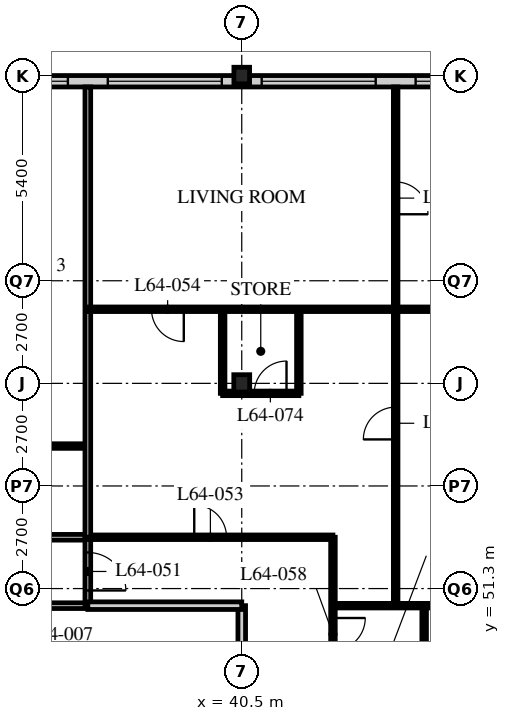
"""IFC4 building model, lengths in metres.
Left out: names, types, materials, properties, quantities, classifications, styles, units other than length and angle.
Written with IfcOpenShell. Run it as: python <this file> out.ifc"""

import sys

from ifc_helpers import new_model, si_unit, direction, frame, frame_2d, origin, origin_2d, place, context, subcontext, project, spatial, rectangle, i_section, extrude, element, fill, save


model = new_model("IFC4")
c1 = context("Model", 3, precision=1e-05, world=origin(), true_north=direction((0.0, 1.0)))
c2 = subcontext(c1, "Body", "Model", "MODEL_VIEW")
j1 = project(units=[si_unit("LENGTHUNIT", "METRE"), si_unit("PLANEANGLEUNIT", "RADIAN")], contexts=[c1])
p1 = place(None, origin())
s1 = spatial("IfcSite", under=j1, at=p1, CompositionType="ELEMENT")
p2 = place(p1, origin())
s2 = spatial("IfcBuilding", under=s1, at=p2, CompositionType="ELEMENT")
p3 = place(p2, frame((0.0, 0.0, 250.2)))
s3 = spatial("IfcBuildingStorey", under=s2, at=p3, CompositionType="ELEMENT", Elevation=250.2)
p4 = place(p3, frame((40.5, 56.7, 0.0), z_axis=(0.0, 0.0, 1.0), x_axis=(1.0, 0.0, 0.0)))
e1 = element("IfcColumn", 1, at=p4, inside=s3, PredefinedType="COLUMN", context=c2, shape_type="SweptSolid", body=[
    extrude(i_section(OverallWidth=0.418, OverallDepth=0.456, WebThickness=0.042, FlangeThickness=0.067, FilletRadius=0.015, at=origin_2d()), origin(), (0.0, 0.0, 1.0), 3.9),
])
p5 = place(p3, frame((40.5, 64.8, 0.0), z_axis=(0.0, 0.0, 1.0), x_axis=(1.0, 0.0, 0.0)))
e2 = element("IfcColumn", 2, at=p5, inside=s3, PredefinedType="COLUMN", context=c2, shape_type="SweptSolid", body=[
    extrude(i_section(OverallWidth=0.412, OverallDepth=0.437, WebThickness=0.036, FlangeThickness=0.058, FilletRadius=0.015, at=origin_2d()), origin(), (0.0, 0.0, 1.0), 3.9),
])
p6 = place(p3, frame((48.3, 64.65, 0.0), z_axis=(0.0, 0.0, 1.0), x_axis=(-1.0, 0.0, 0.0)))
e3 = element("IfcWall", 3, at=p6, inside=s3, PredefinedType="SOLIDWALL", context=c2, shape_type="SweptSolid", body=[
    extrude(rectangle(XDim=40.2, YDim=0.3, at=frame_2d((20.1, 0.0))), origin(), (0.0, 0.0, 1.0), 3.69),
])
p7 = place(p6, frame((0.225, 0.0, 0.6)))
e4 = element("IfcOpeningElement", 4, at=p7, cuts=e3, PredefinedType="OPENING", context=c2, shape_type="SweptSolid", body=[
    extrude(rectangle(XDim=3.0, YDim=2.4, at=frame_2d((1.5, 1.2))), frame((0.0, 0.16, 0.0), z_axis=(0.0, -1.0, 0.0), x_axis=(1.0, 0.0, 0.0)), (0.0, 0.0, 1.0), 0.32),
])
p8 = place(p6, frame((4.275, 0.0, 0.6)))
e5 = element("IfcOpeningElement", 5, at=p8, cuts=e3, PredefinedType="OPENING", context=c2, shape_type="SweptSolid", body=[
    extrude(rectangle(XDim=3.0, YDim=2.4, at=frame_2d((1.5, 1.2))), frame((0.0, 0.16, 0.0), z_axis=(0.0, -1.0, 0.0), x_axis=(1.0, 0.0, 0.0)), (0.0, 0.0, 1.0), 0.32),
])
p9 = place(p6, frame((8.325, 0.0, 0.6)))
e6 = element("IfcOpeningElement", 6, at=p9, cuts=e3, PredefinedType="OPENING", context=c2, shape_type="SweptSolid", body=[
    extrude(rectangle(XDim=3.0, YDim=2.4, at=frame_2d((1.5, 1.2))), frame((0.0, 0.16, 0.0), z_axis=(0.0, -1.0, 0.0), x_axis=(1.0, 0.0, 0.0)), (0.0, 0.0, 1.0), 0.32),
])
p10 = place(p6, frame((12.375, 0.0, 0.6)))
e7 = element("IfcOpeningElement", 7, at=p10, cuts=e3, PredefinedType="OPENING", context=c2, shape_type="SweptSolid", body=[
    extrude(rectangle(XDim=3.0, YDim=2.4, at=frame_2d((1.5, 1.2))), frame((0.0, 0.16, 0.0), z_axis=(0.0, -1.0, 0.0), x_axis=(1.0, 0.0, 0.0)), (0.0, 0.0, 1.0), 0.32),
])
p11 = place(p6, frame((16.425, 0.0, 0.6)))
e8 = element("IfcOpeningElement", 8, at=p11, cuts=e3, PredefinedType="OPENING", context=c2, shape_type="SweptSolid", body=[
    extrude(rectangle(XDim=3.0, YDim=2.4, at=frame_2d((1.5, 1.2))), frame((0.0, 0.16, 0.0), z_axis=(0.0, -1.0, 0.0), x_axis=(1.0, 0.0, 0.0)), (0.0, 0.0, 1.0), 0.32),
])
p12 = place(p6, frame((20.475, 0.0, 0.6)))
e9 = element("IfcOpeningElement", 9, at=p12, cuts=e3, PredefinedType="OPENING", context=c2, shape_type="SweptSolid", body=[
    extrude(rectangle(XDim=3.0, YDim=2.4, at=frame_2d((1.5, 1.2))), frame((0.0, 0.16, 0.0), z_axis=(0.0, -1.0, 0.0), x_axis=(1.0, 0.0, 0.0)), (0.0, 0.0, 1.0), 0.32),
])
p13 = place(p6, frame((24.525, 0.0, 0.6)))
e10 = element("IfcOpeningElement", 10, at=p13, cuts=e3, PredefinedType="OPENING", context=c2, shape_type="SweptSolid", body=[
    extrude(rectangle(XDim=3.0, YDim=2.4, at=frame_2d((1.5, 1.2))), frame((0.0, 0.16, 0.0), z_axis=(0.0, -1.0, 0.0), x_axis=(1.0, 0.0, 0.0)), (0.0, 0.0, 1.0), 0.32),
])
p14 = place(p6, frame((28.575, 0.0, 0.6)))
e11 = element("IfcOpeningElement", 11, at=p14, cuts=e3, PredefinedType="OPENING", context=c2, shape_type="SweptSolid", body=[
    extrude(rectangle(XDim=3.0, YDim=2.4, at=frame_2d((1.5, 1.2))), frame((0.0, 0.16, 0.0), z_axis=(0.0, -1.0, 0.0), x_axis=(1.0, 0.0, 0.0)), (0.0, 0.0, 1.0), 0.32),
])
p15 = place(p6, frame((32.625, 0.0, 0.6)))
e12 = element("IfcOpeningElement", 12, at=p15, cuts=e3, PredefinedType="OPENING", context=c2, shape_type="SweptSolid", body=[
    extrude(rectangle(XDim=3.0, YDim=2.4, at=frame_2d((1.5, 1.2))), frame((0.0, 0.16, 0.0), z_axis=(0.0, -1.0, 0.0), x_axis=(1.0, 0.0, 0.0)), (0.0, 0.0, 1.0), 0.32),
])
p16 = place(p6, frame((36.675, 0.0, 0.6)))
e13 = element("IfcOpeningElement", 13, at=p16, cuts=e3, PredefinedType="OPENING", context=c2, shape_type="SweptSolid", body=[
    extrude(rectangle(XDim=3.0, YDim=2.4, at=frame_2d((1.5, 1.2))), frame((0.0, 0.16, 0.0), z_axis=(0.0, -1.0, 0.0), x_axis=(1.0, 0.0, 0.0)), (0.0, 0.0, 1.0), 0.32),
])
p17 = place(p3, frame((12.15, 52.65, 0.0), z_axis=(0.0, 0.0, 1.0), x_axis=(1.0, 0.0, 0.0)))
e14 = element("IfcWall", 14, at=p17, inside=s3, PredefinedType="PARTITIONING", context=c2, shape_type="SweptSolid", body=[
    extrude(rectangle(XDim=24.3, YDim=0.15, at=frame_2d((12.15, 0.0))), origin(), (0.0, 0.0, 1.0), 3.69),
])
p18 = place(p17, frame((4.45, 0.0, 0.0)))
e15 = element("IfcOpeningElement", 15, at=p18, cuts=e14, PredefinedType="OPENING", context=c2, shape_type="SweptSolid", body=[
    extrude(rectangle(XDim=1.0, YDim=2.1, at=frame_2d((0.5, 1.05))), frame((0.0, 0.085, 0.0), z_axis=(0.0, -1.0, 0.0), x_axis=(1.0, 0.0, 0.0)), (0.0, 0.0, 1.0), 0.17),
])
p19 = place(p17, frame((1.525, 0.0, 0.0)))
e16 = element("IfcOpeningElement", 16, at=p19, cuts=e14, PredefinedType="OPENING", context=c2, shape_type="SweptSolid", body=[
    extrude(rectangle(XDim=1.0, YDim=2.1, at=frame_2d((0.5, 1.05))), frame((0.0, 0.085, 0.0), z_axis=(0.0, -1.0, 0.0), x_axis=(1.0, 0.0, 0.0)), (0.0, 0.0, 1.0), 0.17),
])
p20 = place(p3, frame((29.56, 50.85, 0.0), z_axis=(0.0, 0.0, 1.0), x_axis=(1.0, 0.0, 0.0)))
e17 = element("IfcWall", 17, at=p20, inside=s3, PredefinedType="PARTITIONING", context=c2, shape_type="SweptSolid", body=[
    extrude(rectangle(XDim=6.89, YDim=0.15, at=frame_2d((3.445, 0.0))), origin(), (0.0, 0.0, 1.0), 3.69),
])
p21 = place(p20, frame((0.657, 0.0, 0.0)))
e18 = element("IfcOpeningElement", 18, at=p21, cuts=e17, PredefinedType="OPENING", context=c2, shape_type="SweptSolid", body=[
    extrude(rectangle(XDim=1.0, YDim=2.1, at=frame_2d((0.5, 1.05))), frame((0.0, 0.085, 0.0), z_axis=(0.0, -1.0, 0.0), x_axis=(1.0, 0.0, 0.0)), (0.0, 0.0, 1.0), 0.17),
])
p22 = place(p20, frame((2.84, 0.0, 0.0)))
e19 = element("IfcOpeningElement", 19, at=p22, cuts=e17, PredefinedType="OPENING", context=c2, shape_type="SweptSolid", body=[
    extrude(rectangle(XDim=1.0, YDim=2.1, at=frame_2d((0.5, 1.05))), frame((0.0, 0.085, 0.0), z_axis=(0.0, -1.0, 0.0), x_axis=(1.0, 0.0, 0.0)), (0.0, 0.0, 1.0), 0.17),
])
p23 = place(p20, frame((4.873, 0.0, 0.0)))
e20 = element("IfcOpeningElement", 20, at=p23, cuts=e17, PredefinedType="OPENING", context=c2, shape_type="SweptSolid", body=[
    extrude(rectangle(XDim=1.0, YDim=2.1, at=frame_2d((0.5, 1.05))), frame((0.0, 0.085, 0.0), z_axis=(0.0, -1.0, 0.0), x_axis=(1.0, 0.0, 0.0)), (0.0, 0.0, 1.0), 0.17),
])
p24 = place(p3, frame((36.45, 50.85, 0.0), z_axis=(0.0, 0.0, 1.0), x_axis=(0.0, 1.0, 0.0)))
e21 = element("IfcWall", 21, at=p24, inside=s3, PredefinedType="PARTITIONING", context=c2, shape_type="SweptSolid", body=[
    extrude(rectangle(XDim=1.8, YDim=0.15, at=frame_2d((0.9, 0.0))), origin(), (0.0, 0.0, 1.0), 3.69),
])
p25 = place(p24, frame((0.4, 0.0, 0.0)))
e22 = element("IfcOpeningElement", 22, at=p25, cuts=e21, PredefinedType="OPENING", context=c2, shape_type="SweptSolid", body=[
    extrude(rectangle(XDim=1.0, YDim=2.1, at=frame_2d((0.5, 1.05))), frame((0.0, 0.085, 0.0), z_axis=(0.0, -1.0, 0.0), x_axis=(1.0, 0.0, 0.0)), (0.0, 0.0, 1.0), 0.17),
])
p26 = place(p3, frame((40.5, 40.5, 0.0), z_axis=(0.0, 0.0, 1.0), x_axis=(0.0, 1.0, 0.0)))
e23 = element("IfcWall", 23, at=p26, inside=s3, PredefinedType="SOLIDWALL", context=c2, shape_type="SweptSolid", body=[
    extrude(rectangle(XDim=10.35, YDim=0.2, at=frame_2d((5.175, 0.0))), origin(), (0.0, 0.0, 1.0), 3.078),
])
p27 = place(p3, frame((8.15, 55.05, 0.0), z_axis=(0.0, 0.0, 1.0), x_axis=(1.0, 0.0, 0.0)))
e24 = element("IfcWall", 24, at=p27, inside=s3, PredefinedType="PARTITIONING", context=c2, shape_type="SweptSolid", body=[
    extrude(rectangle(XDim=28.3, YDim=0.12, at=frame_2d((14.15, 0.0))), origin(), (0.0, 0.0, 1.0), 3.69),
])
p28 = place(p27, frame((9.025, 0.0, 0.0)))
e25 = element("IfcOpeningElement", 25, at=p28, cuts=e24, PredefinedType="OPENING", context=c2, shape_type="SweptSolid", body=[
    extrude(rectangle(XDim=0.85, YDim=2.1, at=frame_2d((0.425, 1.05))), frame((0.0, 0.07, 0.0), z_axis=(0.0, -1.0, 0.0), x_axis=(1.0, 0.0, 0.0)), (0.0, 0.0, 1.0), 0.14),
])
p29 = place(p27, frame((16.475, 0.0, 0.0)))
e26 = element("IfcOpeningElement", 26, at=p29, cuts=e24, PredefinedType="OPENING", context=c2, shape_type="SweptSolid", body=[
    extrude(rectangle(XDim=0.85, YDim=2.1, at=frame_2d((0.425, 1.05))), frame((0.0, 0.07, 0.0), z_axis=(0.0, -1.0, 0.0), x_axis=(1.0, 0.0, 0.0)), (0.0, 0.0, 1.0), 0.14),
])
p30 = place(p27, frame((20.525, 0.0, 0.0)))
e27 = element("IfcOpeningElement", 27, at=p30, cuts=e24, PredefinedType="OPENING", context=c2, shape_type="SweptSolid", body=[
    extrude(rectangle(XDim=0.85, YDim=2.1, at=frame_2d((0.425, 1.05))), frame((0.0, 0.07, 0.0), z_axis=(0.0, -1.0, 0.0), x_axis=(1.0, 0.0, 0.0)), (0.0, 0.0, 1.0), 0.14),
])
p31 = place(p27, frame((24.575, 0.0, 0.0)))
e28 = element("IfcOpeningElement", 28, at=p31, cuts=e24, PredefinedType="OPENING", context=c2, shape_type="SweptSolid", body=[
    extrude(rectangle(XDim=0.85, YDim=2.1, at=frame_2d((0.425, 1.05))), frame((0.0, 0.07, 0.0), z_axis=(0.0, -1.0, 0.0), x_axis=(1.0, 0.0, 0.0)), (0.0, 0.0, 1.0), 0.14),
])
p32 = place(p27, frame((6.725, 0.0, 0.0)))
e29 = element("IfcOpeningElement", 29, at=p32, cuts=e24, PredefinedType="OPENING", context=c2, shape_type="SweptSolid", body=[
    extrude(rectangle(XDim=0.85, YDim=2.1, at=frame_2d((0.425, 1.05))), frame((0.0, 0.07, 0.0), z_axis=(0.0, -1.0, 0.0), x_axis=(1.0, 0.0, 0.0)), (0.0, 0.0, 1.0), 0.14),
])
p33 = place(p27, frame((2.875, 0.0, 0.0)))
e30 = element("IfcOpeningElement", 30, at=p33, cuts=e24, PredefinedType="OPENING", context=c2, shape_type="SweptSolid", body=[
    extrude(rectangle(XDim=0.85, YDim=2.1, at=frame_2d((0.425, 1.05))), frame((0.0, 0.07, 0.0), z_axis=(0.0, -1.0, 0.0), x_axis=(1.0, 0.0, 0.0)), (0.0, 0.0, 1.0), 0.14),
])
p34 = place(p3, frame((42.9, 52.65, 0.0), z_axis=(0.0, 0.0, 1.0), x_axis=(0.0, -1.0, 0.0)))
e31 = element("IfcWall", 31, at=p34, inside=s3, PredefinedType="PARTITIONING", context=c2, shape_type="SweptSolid", body=[
    extrude(rectangle(XDim=16.2, YDim=0.12, at=frame_2d((8.1, 0.0))), origin(), (0.0, 0.0, 1.0), 3.69),
])
p35 = place(p34, frame((2.125, 0.0, 0.0)))
e32 = element("IfcOpeningElement", 32, at=p35, cuts=e31, PredefinedType="OPENING", context=c2, shape_type="SweptSolid", body=[
    extrude(rectangle(XDim=0.85, YDim=2.1, at=frame_2d((0.425, 1.05))), frame((0.0, 0.07, 0.0), z_axis=(0.0, -1.0, 0.0), x_axis=(1.0, 0.0, 0.0)), (0.0, 0.0, 1.0), 0.14),
])
p36 = place(p34, frame((8.425, 0.0, 0.0)))
e33 = element("IfcOpeningElement", 33, at=p36, cuts=e31, PredefinedType="OPENING", context=c2, shape_type="SweptSolid", body=[
    extrude(rectangle(XDim=0.85, YDim=2.1, at=frame_2d((0.425, 1.05))), frame((0.0, 0.07, 0.0), z_axis=(0.0, -1.0, 0.0), x_axis=(1.0, 0.0, 0.0)), (0.0, 0.0, 1.0), 0.14),
])
p37 = place(p34, frame((12.475, 0.0, 0.0)))
e34 = element("IfcOpeningElement", 34, at=p37, cuts=e31, PredefinedType="OPENING", context=c2, shape_type="SweptSolid", body=[
    extrude(rectangle(XDim=0.85, YDim=2.1, at=frame_2d((0.425, 1.05))), frame((0.0, 0.07, 0.0), z_axis=(0.0, -1.0, 0.0), x_axis=(1.0, 0.0, 0.0)), (0.0, 0.0, 1.0), 0.14),
])
p38 = place(p3, frame((36.45, 52.65, 0.0), z_axis=(0.0, 0.0, 1.0), x_axis=(1.0, 0.0, 0.0)))
e35 = element("IfcWall", 35, at=p38, inside=s3, PredefinedType="PARTITIONING", context=c2, shape_type="SweptSolid", body=[
    extrude(rectangle(XDim=6.45, YDim=0.12, at=frame_2d((3.225, 0.0))), origin(), (0.0, 0.0, 1.0), 3.69),
])
p39 = place(p38, frame((2.8, 0.0, 0.0)))
e36 = element("IfcOpeningElement", 36, at=p39, cuts=e35, PredefinedType="OPENING", context=c2, shape_type="SweptSolid", body=[
    extrude(rectangle(XDim=0.85, YDim=2.1, at=frame_2d((0.425, 1.05))), frame((0.0, 0.07, 0.0), z_axis=(0.0, -1.0, 0.0), x_axis=(1.0, 0.0, 0.0)), (0.0, 0.0, 1.0), 0.14),
])
p40 = place(p3, frame((36.45, 50.85, 0.0), z_axis=(0.0, 0.0, 1.0), x_axis=(1.0, 0.0, 0.0)))
e37 = element("IfcWall", 37, at=p40, inside=s3, PredefinedType="SOLIDWALL", context=c2, shape_type="SweptSolid", body=[
    extrude(rectangle(XDim=4.05, YDim=0.2, at=frame_2d((2.025, 0.0))), origin(), (0.0, 0.0, 1.0), 3.69),
])
p41 = place(p3, frame((42.9, 50.85, 0.0), z_axis=(0.0, 0.0, 1.0), x_axis=(1.0, 0.0, 0.0)))
e38 = element("IfcWall", 38, at=p41, inside=s3, PredefinedType="PARTITIONING", context=c2, shape_type="SweptSolid", body=[
    extrude(rectangle(XDim=13.5, YDim=0.12, at=frame_2d((6.75, 0.0))), origin(), (0.0, 0.0, 1.0), 3.69),
])
p42 = place(p3, frame((36.45, 64.5, 0.0), z_axis=(0.0, 0.0, 1.0), x_axis=(0.0, -1.0, 0.0)))
e39 = element("IfcWall", 39, at=p42, inside=s3, PredefinedType="PARTITIONING", context=c2, shape_type="SweptSolid", body=[
    extrude(rectangle(XDim=11.85, YDim=0.15, at=frame_2d((5.925, 0.0))), origin(), (0.0, 0.0, 1.0), 3.69),
])
p43 = place(p3, frame((36.45, 58.65, 0.0), z_axis=(0.0, 0.0, 1.0), x_axis=(1.0, 0.0, 0.0)))
e40 = element("IfcWall", 40, at=p43, inside=s3, PredefinedType="PARTITIONING", context=c2, shape_type="SweptSolid", body=[
    extrude(rectangle(XDim=15.9, YDim=0.12, at=frame_2d((7.95, 0.0))), origin(), (0.0, 0.0, 1.0), 3.69),
])
p44 = place(p43, frame((1.675, 0.0, 0.0)))
e41 = element("IfcOpeningElement", 41, at=p44, cuts=e40, PredefinedType="OPENING", context=c2, shape_type="SweptSolid", body=[
    extrude(rectangle(XDim=0.85, YDim=2.1, at=frame_2d((0.425, 1.05))), frame((0.0, 0.07, 0.0), z_axis=(0.0, -1.0, 0.0), x_axis=(1.0, 0.0, 0.0)), (0.0, 0.0, 1.0), 0.14),
])
p45 = place(p3, frame((44.55, 64.5, 0.0), z_axis=(0.0, 0.0, 1.0), x_axis=(0.0, -1.0, 0.0)))
e42 = element("IfcWall", 42, at=p45, inside=s3, PredefinedType="PARTITIONING", context=c2, shape_type="SweptSolid", body=[
    extrude(rectangle(XDim=13.65, YDim=0.12, at=frame_2d((6.825, 0.0))), origin(), (0.0, 0.0, 1.0), 3.69),
])
p46 = place(p45, frame((8.425, 0.0, 0.0)))
e43 = element("IfcOpeningElement", 43, at=p46, cuts=e42, PredefinedType="OPENING", context=c2, shape_type="SweptSolid", body=[
    extrude(rectangle(XDim=0.85, YDim=2.1, at=frame_2d((0.425, 1.05))), frame((0.0, 0.07, 0.0), z_axis=(0.0, -1.0, 0.0), x_axis=(1.0, 0.0, 0.0)), (0.0, 0.0, 1.0), 0.14),
])
p47 = place(p45, frame((2.5, 0.0, 0.0)))
e44 = element("IfcOpeningElement", 44, at=p47, cuts=e42, PredefinedType="OPENING", context=c2, shape_type="SweptSolid", body=[
    extrude(rectangle(XDim=0.85, YDim=2.1, at=frame_2d((0.425, 1.05))), frame((0.0, 0.07, 0.0), z_axis=(0.0, -1.0, 0.0), x_axis=(1.0, 0.0, 0.0)), (0.0, 0.0, 1.0), 0.14),
])
p48 = place(p3, frame((45.3, 50.85, 0.0), z_axis=(0.0, 0.0, 1.0), x_axis=(0.0, -1.0, 0.0)))
e45 = element("IfcWall", 45, at=p48, inside=s3, PredefinedType="PARTITIONING", context=c2, shape_type="SweptSolid", body=[
    extrude(rectangle(XDim=4.01, YDim=0.12, at=frame_2d((2.005, 0.0))), origin(), (0.0, 0.0, 1.0), 3.69),
])
p49 = place(p48, frame((2.885, 0.0, 0.0)))
e46 = element("IfcOpeningElement", 46, at=p49, cuts=e45, PredefinedType="OPENING", context=c2, shape_type="SweptSolid", body=[
    extrude(rectangle(XDim=0.85, YDim=2.1, at=frame_2d((0.425, 1.05))), frame((0.0, 0.07, 0.0), z_axis=(0.0, -1.0, 0.0), x_axis=(1.0, 0.0, 0.0)), (0.0, 0.0, 1.0), 0.14),
])
for number, where, z_axis, x_axis in (
    (47, (39.997, 58.65, 0.0), (0.0, 0.0, 1.0), (0.0, -1.0, 0.0)),
    (48, (42.003, 58.65, 0.0), (0.0, 0.0, 1.0), (0.0, -1.0, 0.0)),
):
    element("IfcWall", number, at=place(p3, frame(where, z_axis=z_axis, x_axis=x_axis)), inside=s3, PredefinedType="PARTITIONING", context=c2, shape_type="SweptSolid", body=[
        extrude(rectangle(XDim=2.213, YDim=0.12, at=frame_2d((1.106, 0.0))), origin(), (0.0, 0.0, 1.0), 3.69),
    ])
p50 = place(p3, frame((39.997, 56.437, 0.0), z_axis=(0.0, 0.0, 1.0), x_axis=(1.0, 0.0, 0.0)))
e49 = element("IfcWall", 49, at=p50, inside=s3, PredefinedType="PARTITIONING", context=c2, shape_type="SweptSolid", body=[
    extrude(rectangle(XDim=2.006, YDim=0.12, at=frame_2d((1.003, 0.0))), origin(), (0.0, 0.0, 1.0), 3.69),
])
p51 = place(p50, frame((0.831, 0.0, 0.0)))
e50 = element("IfcOpeningElement", 50, at=p51, cuts=e49, PredefinedType="OPENING", context=c2, shape_type="SweptSolid", body=[
    extrude(rectangle(XDim=0.85, YDim=2.1, at=frame_2d((0.425, 1.05))), frame((0.0, 0.07, 0.0), z_axis=(0.0, -1.0, 0.0), x_axis=(1.0, 0.0, 0.0)), (0.0, 0.0, 1.0), 0.14),
])
p52 = place(p7, origin())
e51 = element("IfcWindow", 51, at=p52, inside=s3, PartitioningType="SINGLE_PANEL", PredefinedType="WINDOW", context=c2, shape_type="SweptSolid", body=[
    extrude(rectangle(XDim=3.0, YDim=2.4, at=frame_2d((1.5, 1.2))), frame((0.0, 0.03, 0.0), z_axis=(0.0, -1.0, 0.0), x_axis=(1.0, 0.0, 0.0)), (0.0, 0.0, 1.0), 0.06),
])
fill(e4, e51)
p53 = place(p8, origin())
e52 = element("IfcWindow", 52, at=p53, inside=s3, PartitioningType="SINGLE_PANEL", PredefinedType="WINDOW", context=c2, shape_type="SweptSolid", body=[
    extrude(rectangle(XDim=3.0, YDim=2.4, at=frame_2d((1.5, 1.2))), frame((0.0, 0.03, 0.0), z_axis=(0.0, -1.0, 0.0), x_axis=(1.0, 0.0, 0.0)), (0.0, 0.0, 1.0), 0.06),
])
fill(e5, e52)
p54 = place(p9, origin())
e53 = element("IfcWindow", 53, at=p54, inside=s3, PartitioningType="SINGLE_PANEL", PredefinedType="WINDOW", context=c2, shape_type="SweptSolid", body=[
    extrude(rectangle(XDim=3.0, YDim=2.4, at=frame_2d((1.5, 1.2))), frame((0.0, 0.03, 0.0), z_axis=(0.0, -1.0, 0.0), x_axis=(1.0, 0.0, 0.0)), (0.0, 0.0, 1.0), 0.06),
])
fill(e6, e53)
p55 = place(p10, origin())
e54 = element("IfcWindow", 54, at=p55, inside=s3, PartitioningType="SINGLE_PANEL", PredefinedType="WINDOW", context=c2, shape_type="SweptSolid", body=[
    extrude(rectangle(XDim=3.0, YDim=2.4, at=frame_2d((1.5, 1.2))), frame((0.0, 0.03, 0.0), z_axis=(0.0, -1.0, 0.0), x_axis=(1.0, 0.0, 0.0)), (0.0, 0.0, 1.0), 0.06),
])
fill(e7, e54)
p56 = place(p25, origin())
e55 = element("IfcDoor", 55, at=p56, inside=s3, OperationType="SINGLE_SWING_RIGHT", PredefinedType="DOOR", context=c2, shape_type="SweptSolid", body=[
    extrude(rectangle(XDim=1.0, YDim=2.1, at=frame_2d((0.5, 1.05))), frame((0.0, 0.025, 0.0), z_axis=(0.0, -1.0, 0.0), x_axis=(1.0, 0.0, 0.0)), (0.0, 0.0, 1.0), 0.05),
])
fill(e22, e55)
p57 = place(p39, origin())
e56 = element("IfcDoor", 56, at=p57, inside=s3, OperationType="SINGLE_SWING_LEFT", PredefinedType="DOOR", context=c2, shape_type="SweptSolid", body=[
    extrude(rectangle(XDim=0.85, YDim=2.1, at=frame_2d((0.425, 1.05))), frame((0.0, 0.025, 0.0), z_axis=(0.0, -1.0, 0.0), x_axis=(1.0, 0.0, 0.0)), (0.0, 0.0, 1.0), 0.05),
])
fill(e36, e56)
p58 = place(p44, origin())
e57 = element("IfcDoor", 57, at=p58, inside=s3, OperationType="SINGLE_SWING_LEFT", PredefinedType="DOOR", context=c2, shape_type="SweptSolid", body=[
    extrude(rectangle(XDim=0.85, YDim=2.1, at=frame_2d((0.425, 1.05))), frame((0.0, 0.025, 0.0), z_axis=(0.0, -1.0, 0.0), x_axis=(1.0, 0.0, 0.0)), (0.0, 0.0, 1.0), 0.05),
])
fill(e41, e57)
p59 = place(p46, origin())
e58 = element("IfcDoor", 58, at=p59, inside=s3, OperationType="SINGLE_SWING_LEFT", PredefinedType="DOOR", context=c2, shape_type="SweptSolid", body=[
    extrude(rectangle(XDim=0.85, YDim=2.1, at=frame_2d((0.425, 1.05))), frame((0.0, 0.025, 0.0), z_axis=(0.0, -1.0, 0.0), x_axis=(1.0, 0.0, 0.0)), (0.0, 0.0, 1.0), 0.05),
])
fill(e43, e58)
p60 = place(p47, origin())
e59 = element("IfcDoor", 59, at=p60, inside=s3, OperationType="SINGLE_SWING_RIGHT", PredefinedType="DOOR", context=c2, shape_type="SweptSolid", body=[
    extrude(rectangle(XDim=0.85, YDim=2.1, at=frame_2d((0.425, 1.05))), frame((0.0, 0.025, 0.0), z_axis=(0.0, -1.0, 0.0), x_axis=(1.0, 0.0, 0.0)), (0.0, 0.0, 1.0), 0.05),
])
fill(e44, e59)
p61 = place(p35, origin())
e60 = element("IfcDoor", 60, at=p61, inside=s3, OperationType="SINGLE_SWING_LEFT", PredefinedType="DOOR", context=c2, shape_type="SweptSolid", body=[
    extrude(rectangle(XDim=0.85, YDim=2.1, at=frame_2d((0.425, 1.05))), frame((0.0, 0.025, 0.0), z_axis=(0.0, -1.0, 0.0), x_axis=(1.0, 0.0, 0.0)), (0.0, 0.0, 1.0), 0.05),
])
fill(e32, e60)
p62 = place(p51, origin())
e61 = element("IfcDoor", 61, at=p62, inside=s3, OperationType="SINGLE_SWING_RIGHT", PredefinedType="DOOR", context=c2, shape_type="SweptSolid", body=[
    extrude(rectangle(XDim=0.85, YDim=2.1, at=frame_2d((0.425, 1.05))), frame((0.0, 0.025, 0.0), z_axis=(0.0, -1.0, 0.0), x_axis=(1.0, 0.0, 0.0)), (0.0, 0.0, 1.0), 0.05),
])
fill(e50, e61)
save(model, sys.argv[1])
